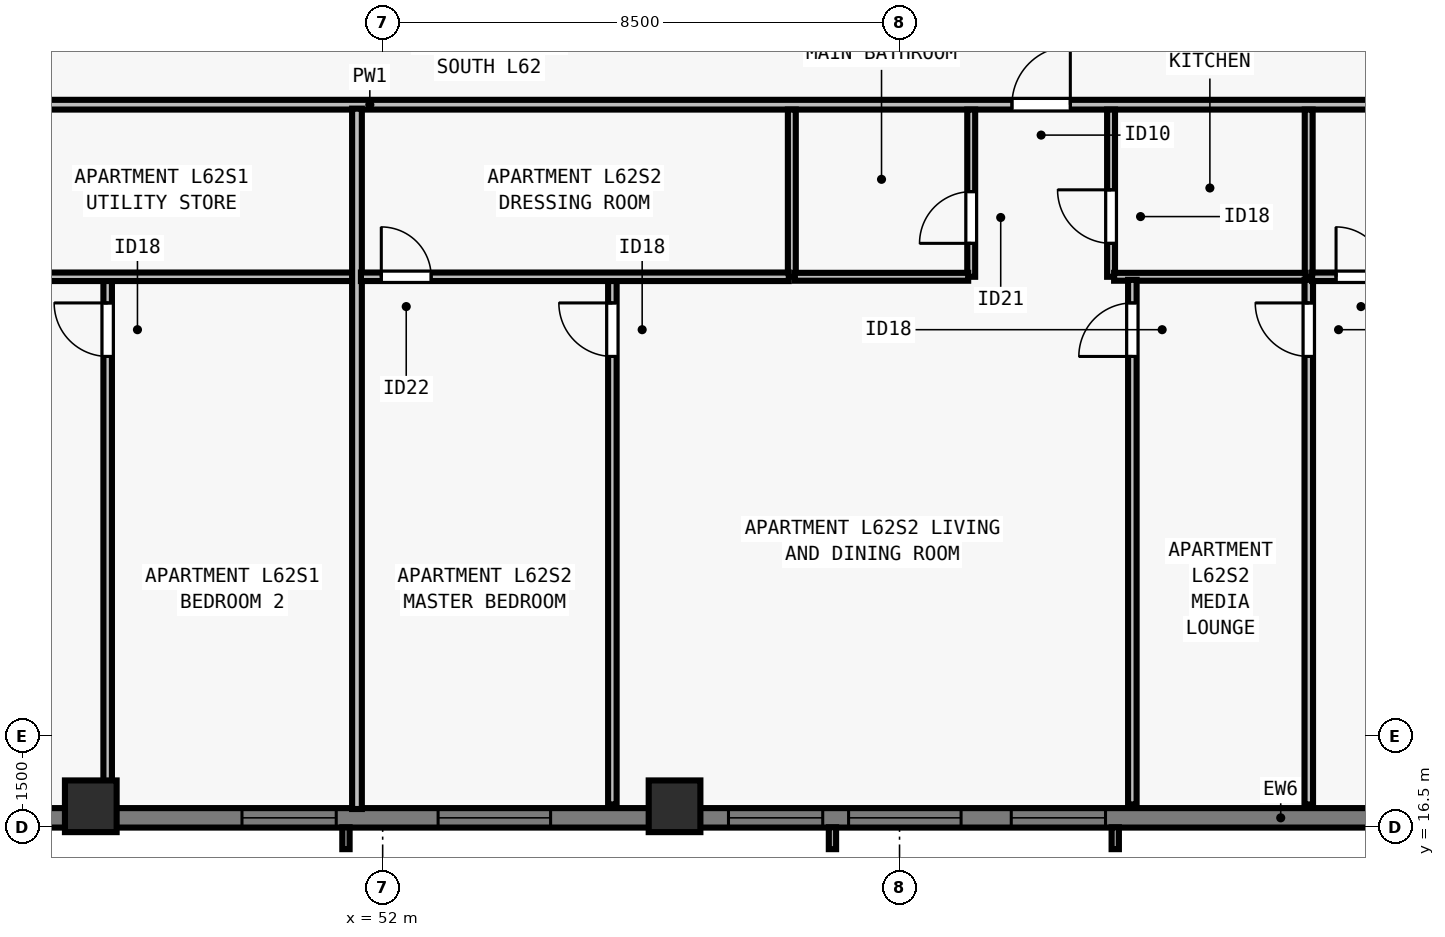
"""IFC4 building model, lengths in metres.
Left out: names, types, materials, properties, quantities, classifications, styles, units other than length and angle.
Written with IfcOpenShell. Run it as: python <this file> out.ifc"""

import sys

from ifc_helpers import new_model, si_unit, direction, frame, frame_2d, origin, origin_2d, place, context, subcontext, project, spatial, rectangle, extrude, element, fill, save


model = new_model("IFC4")
c1 = context("Model", 3, precision=1e-05, world=origin(), true_north=direction((0.0, 1.0)))
c2 = subcontext(c1, "Body", "Model", "MODEL_VIEW")
j1 = project(units=[si_unit("LENGTHUNIT", "METRE"), si_unit("PLANEANGLEUNIT", "RADIAN")], contexts=[c1])
p1 = place(None, origin())
s1 = spatial("IfcSite", under=j1, at=p1, CompositionType="ELEMENT")
p2 = place(p1, origin())
s2 = spatial("IfcBuilding", under=s1, at=p2, CompositionType="ELEMENT")
p3 = place(p2, frame((0.0, 0.0, 227.0)))
s3 = spatial("IfcBuildingStorey", under=s2, at=p3, CompositionType="ELEMENT", Elevation=227.0)
for number, where, z_axis, x_axis in (
    (1, (47.2, 16.85, 0.0), (0.0, 0.0, 1.0), (1.0, 0.0, 0.0)),
    (2, (56.8, 16.85, 0.0), (0.0, 0.0, 1.0), (1.0, 0.0, 0.0)),
):
    element("IfcColumn", number, at=place(p3, frame(where, z_axis=z_axis, x_axis=x_axis)), inside=s3, PredefinedType="COLUMN", context=c2, shape_type="SweptSolid", body=[
        extrude(rectangle(XDim=0.85, YDim=0.85, at=origin_2d()), origin(), (0.0, 0.0, 1.0), 3.5),
    ])
p4 = place(p3, frame((69.5, 16.66, 0.0), z_axis=(0.0, 0.0, 1.0), x_axis=(-1.0, 0.0, 0.0)))
e3 = element("IfcWall", 3, at=p4, inside=s3, PredefinedType="SOLIDWALL", context=c2, shape_type="SweptSolid", body=[
    extrude(rectangle(XDim=34.702, YDim=0.32, at=frame_2d((17.351, 0.0))), origin(), (0.0, 0.0, 1.0), 3.29),
])
p5 = place(p4, frame((5.613, 0.0, 0.8)))
e4 = element("IfcOpeningElement", 4, at=p5, cuts=e3, PredefinedType="OPENING", context=c2, shape_type="SweptSolid", body=[
    extrude(rectangle(XDim=1.55, YDim=1.678, at=frame_2d((0.775, 0.839))), frame((0.0, 0.17, 0.0), z_axis=(0.0, -1.0, 0.0), x_axis=(1.0, 0.0, 0.0)), (0.0, 0.0, 1.0), 0.34),
])
p6 = place(p4, frame((7.988, 0.0, 0.8)))
e5 = element("IfcOpeningElement", 5, at=p6, cuts=e3, PredefinedType="OPENING", context=c2, shape_type="SweptSolid", body=[
    extrude(rectangle(XDim=1.85, YDim=1.678, at=frame_2d((0.925, 0.839))), frame((0.0, 0.17, 0.0), z_axis=(0.0, -1.0, 0.0), x_axis=(1.0, 0.0, 0.0)), (0.0, 0.0, 1.0), 0.34),
])
p7 = place(p4, frame((10.263, 0.0, 0.8)))
e6 = element("IfcOpeningElement", 6, at=p7, cuts=e3, PredefinedType="OPENING", context=c2, shape_type="SweptSolid", body=[
    extrude(rectangle(XDim=1.55, YDim=1.678, at=frame_2d((0.775, 0.839))), frame((0.0, 0.17, 0.0), z_axis=(0.0, -1.0, 0.0), x_axis=(1.0, 0.0, 0.0)), (0.0, 0.0, 1.0), 0.34),
])
p8 = place(p4, frame((14.738, 0.0, 0.8)))
e7 = element("IfcOpeningElement", 7, at=p8, cuts=e3, PredefinedType="OPENING", context=c2, shape_type="SweptSolid", body=[
    extrude(rectangle(XDim=1.85, YDim=1.678, at=frame_2d((0.925, 0.839))), frame((0.0, 0.17, 0.0), z_axis=(0.0, -1.0, 0.0), x_axis=(1.0, 0.0, 0.0)), (0.0, 0.0, 1.0), 0.34),
])
p9 = place(p4, frame((18.264, 0.0, 0.8)))
e8 = element("IfcOpeningElement", 8, at=p9, cuts=e3, PredefinedType="OPENING", context=c2, shape_type="SweptSolid", body=[
    extrude(rectangle(XDim=1.55, YDim=1.678, at=frame_2d((0.775, 0.839))), frame((0.0, 0.17, 0.0), z_axis=(0.0, -1.0, 0.0), x_axis=(1.0, 0.0, 0.0)), (0.0, 0.0, 1.0), 0.34),
])
p10 = place(p4, frame((24.564, 0.0, 0.8)))
e9 = element("IfcOpeningElement", 9, at=p10, cuts=e3, PredefinedType="OPENING", context=c2, shape_type="SweptSolid", body=[
    extrude(rectangle(XDim=1.55, YDim=1.678, at=frame_2d((0.775, 0.839))), frame((0.0, 0.17, 0.0), z_axis=(0.0, -1.0, 0.0), x_axis=(1.0, 0.0, 0.0)), (0.0, 0.0, 1.0), 0.34),
])
p11 = place(p4, frame((28.24, 0.0, 0.8)))
e10 = element("IfcOpeningElement", 10, at=p11, cuts=e3, PredefinedType="OPENING", context=c2, shape_type="SweptSolid", body=[
    extrude(rectangle(XDim=1.85, YDim=1.678, at=frame_2d((0.925, 0.839))), frame((0.0, 0.17, 0.0), z_axis=(0.0, -1.0, 0.0), x_axis=(1.0, 0.0, 0.0)), (0.0, 0.0, 1.0), 0.34),
])
p12 = place(p3, frame((29.805, 28.387, 0.0), z_axis=(0.0, 0.0, 1.0), x_axis=(1.0, 0.0, 0.0)))
e11 = element("IfcWall", 11, at=p12, inside=s3, PredefinedType="PARTITIONING", context=c2, shape_type="SweptSolid", body=[
    extrude(rectangle(XDim=44.39, YDim=0.16, at=frame_2d((22.195, 0.0))), origin(), (0.0, 0.0, 1.0), 2.958),
])
p13 = place(p12, frame((10.464, 0.0, 0.0)))
e12 = element("IfcOpeningElement", 12, at=p13, cuts=e11, PredefinedType="OPENING", context=c2, shape_type="SweptSolid", body=[
    extrude(rectangle(XDim=0.96, YDim=2.18, at=frame_2d((0.48, 1.09))), frame((0.0, 0.09, 0.0), z_axis=(0.0, -1.0, 0.0), x_axis=(1.0, 0.0, 0.0)), (0.0, 0.0, 1.0), 0.18),
])
p14 = place(p12, frame((32.544, 0.0, 0.0)))
e13 = element("IfcOpeningElement", 13, at=p14, cuts=e11, PredefinedType="OPENING", context=c2, shape_type="SweptSolid", body=[
    extrude(rectangle(XDim=0.96, YDim=2.18, at=frame_2d((0.48, 1.09))), frame((0.0, 0.09, 0.0), z_axis=(0.0, -1.0, 0.0), x_axis=(1.0, 0.0, 0.0)), (0.0, 0.0, 1.0), 0.18),
])
p15 = place(p3, frame((47.478, 16.88, 0.0), z_axis=(0.0, 0.0, 1.0), x_axis=(0.0, 1.0, 0.0)))
e14 = element("IfcWall", 14, at=p15, inside=s3, PredefinedType="PARTITIONING", context=c2, shape_type="SweptSolid", body=[
    extrude(rectangle(XDim=8.718, YDim=0.14, at=frame_2d((4.359, 0.0))), origin(), (0.0, 0.0, 1.0), 2.958),
])
p16 = place(p15, frame((7.367, 0.0, 0.0)))
e15 = element("IfcOpeningElement", 15, at=p16, cuts=e14, PredefinedType="OPENING", context=c2, shape_type="SweptSolid", body=[
    extrude(rectangle(XDim=0.88, YDim=2.1, at=frame_2d((0.44, 1.05))), frame((0.0, 0.08, 0.0), z_axis=(0.0, -1.0, 0.0), x_axis=(1.0, 0.0, 0.0)), (0.0, 0.0, 1.0), 0.16),
])
p17 = place(p3, frame((45.199, 25.558, 0.0), z_axis=(0.0, 0.0, 1.0), x_axis=(1.0, 0.0, 0.0)))
e16 = element("IfcWall", 16, at=p17, inside=s3, PredefinedType="PARTITIONING", context=c2, shape_type="SweptSolid", body=[
    extrude(rectangle(XDim=6.429, YDim=0.14, at=frame_2d((3.214, 0.0))), origin(), (0.0, 0.0, 1.0), 3.29),
])
p18 = place(p17, frame((0.4, 0.0, 0.0)))
e17 = element("IfcOpeningElement", 17, at=p18, cuts=e16, PredefinedType="OPENING", context=c2, shape_type="SweptSolid", body=[
    extrude(rectangle(XDim=0.82, YDim=2.1, at=frame_2d((0.41, 1.05))), frame((0.0, 0.08, 0.0), z_axis=(0.0, -1.0, 0.0), x_axis=(1.0, 0.0, 0.0)), (0.0, 0.0, 1.0), 0.16),
])
p19 = place(p3, frame((51.577, 16.805, 0.0), z_axis=(0.0, 0.0, 1.0), x_axis=(0.0, 1.0, 0.0)))
e18 = element("IfcWall", 18, at=p19, inside=s3, PredefinedType="PARTITIONING", context=c2, shape_type="SweptSolid", body=[
    extrude(rectangle(XDim=11.518, YDim=0.16, at=frame_2d((5.759, 0.0))), origin(), (0.0, 0.0, 1.0), 2.958),
])
p20 = place(p3, frame((58.729, 25.558, 0.0), z_axis=(0.0, 0.0, 1.0), x_axis=(0.0, 1.0, 0.0)))
e19 = element("IfcWall", 19, at=p20, inside=s3, PredefinedType="PLUMBINGWALL", context=c2, shape_type="SweptSolid", body=[
    extrude(rectangle(XDim=2.75, YDim=0.13, at=frame_2d((1.375, 0.0))), origin(), (0.0, 0.0, 1.0), 3.29),
])
p21 = place(p3, frame((61.679, 25.558, 0.0), z_axis=(0.0, 0.0, 1.0), x_axis=(0.0, 1.0, 0.0)))
e20 = element("IfcWall", 20, at=p21, inside=s3, PredefinedType="PLUMBINGWALL", context=c2, shape_type="SweptSolid", body=[
    extrude(rectangle(XDim=2.75, YDim=0.13, at=frame_2d((1.375, 0.0))), origin(), (0.0, 0.0, 1.0), 3.29),
])
p22 = place(p21, frame((0.55, 0.0, 0.0)))
e21 = element("IfcOpeningElement", 21, at=p22, cuts=e20, PredefinedType="OPENING", context=c2, shape_type="SweptSolid", body=[
    extrude(rectangle(XDim=0.85, YDim=2.08, at=frame_2d((0.425, 1.04))), frame((0.0, 0.075, 0.0), z_axis=(0.0, -1.0, 0.0), x_axis=(1.0, 0.0, 0.0)), (0.0, 0.0, 1.0), 0.15),
])
p23 = place(p3, frame((58.779, 25.558, 0.0), z_axis=(0.0, 0.0, 1.0), x_axis=(1.0, 0.0, 0.0)))
e22 = element("IfcWall", 22, at=p23, inside=s3, PredefinedType="PLUMBINGWALL", context=c2, shape_type="SweptSolid", body=[
    extrude(rectangle(XDim=2.85, YDim=0.13, at=frame_2d((1.425, 0.0))), origin(), (0.0, 0.0, 1.0), 3.29),
])
p24 = place(p3, frame((67.229, 25.558, 0.0), z_axis=(0.0, 0.0, 1.0), x_axis=(0.0, 1.0, 0.0)))
e23 = element("IfcWall", 23, at=p24, inside=s3, PredefinedType="PLUMBINGWALL", context=c2, shape_type="SweptSolid", body=[
    extrude(rectangle(XDim=2.75, YDim=0.13, at=frame_2d((1.375, 0.0))), origin(), (0.0, 0.0, 1.0), 3.29),
])
p25 = place(p3, frame((63.979, 25.558, 0.0), z_axis=(0.0, 0.0, 1.0), x_axis=(0.0, 1.0, 0.0)))
e24 = element("IfcWall", 24, at=p25, inside=s3, PredefinedType="PLUMBINGWALL", context=c2, shape_type="SweptSolid", body=[
    extrude(rectangle(XDim=2.75, YDim=0.13, at=frame_2d((1.375, 0.0))), origin(), (0.0, 0.0, 1.0), 3.29),
])
p26 = place(p25, frame((0.55, 0.0, 0.0)))
e25 = element("IfcOpeningElement", 25, at=p26, cuts=e24, PredefinedType="OPENING", context=c2, shape_type="SweptSolid", body=[
    extrude(rectangle(XDim=0.88, YDim=2.1, at=frame_2d((0.44, 1.05))), frame((0.0, 0.075, 0.0), z_axis=(0.0, -1.0, 0.0), x_axis=(1.0, 0.0, 0.0)), (0.0, 0.0, 1.0), 0.15),
])
p27 = place(p3, frame((64.029, 25.558, 0.0), z_axis=(0.0, 0.0, 1.0), x_axis=(1.0, 0.0, 0.0)))
e26 = element("IfcWall", 26, at=p27, inside=s3, PredefinedType="PLUMBINGWALL", context=c2, shape_type="SweptSolid", body=[
    extrude(rectangle(XDim=3.15, YDim=0.13, at=frame_2d((1.575, 0.0))), origin(), (0.0, 0.0, 1.0), 3.29),
])
p28 = place(p3, frame((55.778, 16.88, 0.0), z_axis=(0.0, 0.0, 1.0), x_axis=(0.0, 1.0, 0.0)))
e27 = element("IfcWall", 27, at=p28, inside=s3, PredefinedType="PARTITIONING", context=c2, shape_type="SweptSolid", body=[
    extrude(rectangle(XDim=8.718, YDim=0.14, at=frame_2d((4.359, 0.0))), origin(), (0.0, 0.0, 1.0), 3.29),
])
p29 = place(p28, frame((7.367, 0.0, 0.0)))
e28 = element("IfcOpeningElement", 28, at=p29, cuts=e27, PredefinedType="OPENING", context=c2, shape_type="SweptSolid", body=[
    extrude(rectangle(XDim=0.88, YDim=2.1, at=frame_2d((0.44, 1.05))), frame((0.0, 0.08, 0.0), z_axis=(0.0, -1.0, 0.0), x_axis=(1.0, 0.0, 0.0)), (0.0, 0.0, 1.0), 0.16),
])
p30 = place(p3, frame((51.643, 25.558, 0.0), z_axis=(0.0, 0.0, 1.0), x_axis=(1.0, 0.0, 0.0)))
e29 = element("IfcWall", 29, at=p30, inside=s3, PredefinedType="PARTITIONING", context=c2, shape_type="SweptSolid", body=[
    extrude(rectangle(XDim=7.036, YDim=0.14, at=frame_2d((3.518, 0.0))), origin(), (0.0, 0.0, 1.0), 3.29),
])
p31 = place(p30, frame((0.335, 0.0, 0.0)))
e30 = element("IfcOpeningElement", 30, at=p31, cuts=e29, PredefinedType="OPENING", context=c2, shape_type="SweptSolid", body=[
    extrude(rectangle(XDim=0.82, YDim=2.1, at=frame_2d((0.41, 1.05))), frame((0.0, 0.08, 0.0), z_axis=(0.0, -1.0, 0.0), x_axis=(1.0, 0.0, 0.0)), (0.0, 0.0, 1.0), 0.16),
])
p32 = place(p3, frame((67.23, 16.88, 0.0), z_axis=(0.0, 0.0, 1.0), x_axis=(0.0, 1.0, 0.0)))
e31 = element("IfcWall", 31, at=p32, inside=s3, PredefinedType="PARTITIONING", context=c2, shape_type="SweptSolid", body=[
    extrude(rectangle(XDim=8.628, YDim=0.14, at=frame_2d((4.314, 0.0))), origin(), (0.0, 0.0, 1.0), 2.573),
])
p33 = place(p32, frame((7.367, 0.0, 0.0)))
e32 = element("IfcOpeningElement", 32, at=p33, cuts=e31, PredefinedType="OPENING", context=c2, shape_type="SweptSolid", body=[
    extrude(rectangle(XDim=0.88, YDim=2.1, at=frame_2d((0.44, 1.05))), frame((0.0, 0.08, 0.0), z_axis=(0.0, -1.0, 0.0), x_axis=(1.0, 0.0, 0.0)), (0.0, 0.0, 1.0), 0.16),
])
p34 = place(p3, frame((67.285, 25.558, 0.0), z_axis=(0.0, 0.0, 1.0), x_axis=(1.0, 0.0, 0.0)))
e33 = element("IfcWall", 33, at=p34, inside=s3, PredefinedType="PARTITIONING", context=c2, shape_type="SweptSolid", body=[
    extrude(rectangle(XDim=6.845, YDim=0.14, at=frame_2d((3.422, 0.0))), origin(), (0.0, 0.0, 1.0), 2.958),
])
p35 = place(p34, frame((0.394, 0.0, 0.0)))
e34 = element("IfcOpeningElement", 34, at=p35, cuts=e33, PredefinedType="OPENING", context=c2, shape_type="SweptSolid", body=[
    extrude(rectangle(XDim=0.82, YDim=2.1, at=frame_2d((0.41, 1.05))), frame((0.0, 0.08, 0.0), z_axis=(0.0, -1.0, 0.0), x_axis=(1.0, 0.0, 0.0)), (0.0, 0.0, 1.0), 0.16),
])
p36 = place(p3, frame((64.329, 16.88, 0.0), z_axis=(0.0, 0.0, 1.0), x_axis=(0.0, 1.0, 0.0)))
e35 = element("IfcWall", 35, at=p36, inside=s3, PredefinedType="PARTITIONING", context=c2, shape_type="SweptSolid", body=[
    extrude(rectangle(XDim=8.628, YDim=0.14, at=frame_2d((4.314, 0.0))), origin(), (0.0, 0.0, 1.0), 2.573),
])
p37 = place(p36, frame((7.367, 0.0, 0.0)))
e36 = element("IfcOpeningElement", 36, at=p37, cuts=e35, PredefinedType="OPENING", context=c2, shape_type="SweptSolid", body=[
    extrude(rectangle(XDim=0.88, YDim=2.1, at=frame_2d((0.44, 1.05))), frame((0.0, 0.08, 0.0), z_axis=(0.0, -1.0, 0.0), x_axis=(1.0, 0.0, 0.0)), (0.0, 0.0, 1.0), 0.16),
])
p38 = place(p5, origin())
e37 = element("IfcWindow", 37, at=p38, inside=s3, PartitioningType="SINGLE_PANEL", PredefinedType="WINDOW", context=c2, shape_type="SweptSolid", body=[
    extrude(rectangle(XDim=1.55, YDim=1.678, at=frame_2d((0.775, 0.839))), frame((0.0, -0.05, 0.0), z_axis=(0.0, -1.0, 0.0), x_axis=(1.0, 0.0, 0.0)), (0.0, 0.0, 1.0), 0.06),
])
fill(e4, e37)
p39 = place(p6, origin())
e38 = element("IfcWindow", 38, at=p39, inside=s3, PartitioningType="SINGLE_PANEL", PredefinedType="WINDOW", context=c2, shape_type="SweptSolid", body=[
    extrude(rectangle(XDim=1.85, YDim=1.678, at=frame_2d((0.925, 0.839))), frame((0.0, -0.05, 0.0), z_axis=(0.0, -1.0, 0.0), x_axis=(1.0, 0.0, 0.0)), (0.0, 0.0, 1.0), 0.06),
])
fill(e5, e38)
p40 = place(p7, origin())
e39 = element("IfcWindow", 39, at=p40, inside=s3, PartitioningType="SINGLE_PANEL", PredefinedType="WINDOW", context=c2, shape_type="SweptSolid", body=[
    extrude(rectangle(XDim=1.55, YDim=1.678, at=frame_2d((0.775, 0.839))), frame((0.0, -0.05, 0.0), z_axis=(0.0, -1.0, 0.0), x_axis=(1.0, 0.0, 0.0)), (0.0, 0.0, 1.0), 0.06),
])
fill(e6, e39)
p41 = place(p8, origin())
e40 = element("IfcWindow", 40, at=p41, inside=s3, PartitioningType="SINGLE_PANEL", PredefinedType="WINDOW", context=c2, shape_type="SweptSolid", body=[
    extrude(rectangle(XDim=1.85, YDim=1.678, at=frame_2d((0.925, 0.839))), frame((0.0, -0.05, 0.0), z_axis=(0.0, -1.0, 0.0), x_axis=(1.0, 0.0, 0.0)), (0.0, 0.0, 1.0), 0.06),
])
fill(e7, e40)
p42 = place(p9, origin())
e41 = element("IfcWindow", 41, at=p42, inside=s3, PartitioningType="SINGLE_PANEL", PredefinedType="WINDOW", context=c2, shape_type="SweptSolid", body=[
    extrude(rectangle(XDim=1.55, YDim=1.678, at=frame_2d((0.775, 0.839))), frame((0.0, -0.05, 0.0), z_axis=(0.0, -1.0, 0.0), x_axis=(1.0, 0.0, 0.0)), (0.0, 0.0, 1.0), 0.06),
])
fill(e8, e41)
p43 = place(p16, origin())
e42 = element("IfcDoor", 42, at=p43, inside=s3, OperationType="SINGLE_SWING_RIGHT", PredefinedType="DOOR", context=c2, shape_type="SweptSolid", body=[
    extrude(rectangle(XDim=0.88, YDim=2.1, at=frame_2d((0.44, 1.05))), frame((0.0, 0.025, 0.0), z_axis=(0.0, -1.0, 0.0), x_axis=(1.0, 0.0, 0.0)), (0.0, 0.0, 1.0), 0.05),
])
fill(e15, e42)
p44 = place(p22, origin())
e43 = element("IfcDoor", 43, at=p44, inside=s3, OperationType="SINGLE_SWING_LEFT", PredefinedType="DOOR", context=c2, shape_type="SweptSolid", body=[
    extrude(rectangle(XDim=0.85, YDim=2.08, at=frame_2d((0.425, 1.04))), frame((0.0, 0.025, 0.0), z_axis=(0.0, -1.0, 0.0), x_axis=(1.0, 0.0, 0.0)), (0.0, 0.0, 1.0), 0.05),
])
fill(e21, e43)
p45 = place(p26, origin())
e44 = element("IfcDoor", 44, at=p45, inside=s3, OperationType="SINGLE_SWING_RIGHT", PredefinedType="DOOR", context=c2, shape_type="SweptSolid", body=[
    extrude(rectangle(XDim=0.88, YDim=2.1, at=frame_2d((0.44, 1.05))), frame((0.0, 0.025, 0.0), z_axis=(0.0, -1.0, 0.0), x_axis=(1.0, 0.0, 0.0)), (0.0, 0.0, 1.0), 0.05),
])
fill(e25, e44)
p46 = place(p31, origin())
e45 = element("IfcDoor", 45, at=p46, inside=s3, OperationType="SINGLE_SWING_LEFT", PredefinedType="DOOR", context=c2, shape_type="SweptSolid", body=[
    extrude(rectangle(XDim=0.82, YDim=2.1, at=frame_2d((0.41, 1.05))), frame((0.0, 0.025, 0.0), z_axis=(0.0, -1.0, 0.0), x_axis=(1.0, 0.0, 0.0)), (0.0, 0.0, 1.0), 0.05),
])
fill(e30, e45)
p47 = place(p29, origin())
e46 = element("IfcDoor", 46, at=p47, inside=s3, OperationType="SINGLE_SWING_RIGHT", PredefinedType="DOOR", context=c2, shape_type="SweptSolid", body=[
    extrude(rectangle(XDim=0.88, YDim=2.1, at=frame_2d((0.44, 1.05))), frame((0.0, 0.025, 0.0), z_axis=(0.0, -1.0, 0.0), x_axis=(1.0, 0.0, 0.0)), (0.0, 0.0, 1.0), 0.05),
])
fill(e28, e46)
p48 = place(p35, origin())
e47 = element("IfcDoor", 47, at=p48, inside=s3, OperationType="SINGLE_SWING_LEFT", PredefinedType="DOOR", context=c2, shape_type="SweptSolid", body=[
    extrude(rectangle(XDim=0.82, YDim=2.1, at=frame_2d((0.41, 1.05))), frame((0.0, 0.025, 0.0), z_axis=(0.0, -1.0, 0.0), x_axis=(1.0, 0.0, 0.0)), (0.0, 0.0, 1.0), 0.05),
])
fill(e34, e47)
p49 = place(p33, origin())
e48 = element("IfcDoor", 48, at=p49, inside=s3, OperationType="SINGLE_SWING_RIGHT", PredefinedType="DOOR", context=c2, shape_type="SweptSolid", body=[
    extrude(rectangle(XDim=0.88, YDim=2.1, at=frame_2d((0.44, 1.05))), frame((0.0, 0.025, 0.0), z_axis=(0.0, -1.0, 0.0), x_axis=(1.0, 0.0, 0.0)), (0.0, 0.0, 1.0), 0.05),
])
fill(e32, e48)
p50 = place(p37, origin())
e49 = element("IfcDoor", 49, at=p50, inside=s3, OperationType="SINGLE_SWING_LEFT", PredefinedType="DOOR", context=c2, shape_type="SweptSolid", body=[
    extrude(rectangle(XDim=0.88, YDim=2.1, at=frame_2d((0.44, 1.05))), frame((0.0, 0.025, 0.0), z_axis=(0.0, -1.0, 0.0), x_axis=(1.0, 0.0, 0.0)), (0.0, 0.0, 1.0), 0.05),
])
fill(e36, e49)
p51 = place(p14, origin())
e50 = element("IfcDoor", 50, at=p51, inside=s3, OperationType="SINGLE_SWING_RIGHT", PredefinedType="DOOR", context=c2, shape_type="SweptSolid", body=[
    extrude(rectangle(XDim=0.96, YDim=2.18, at=frame_2d((0.48, 1.09))), frame((0.0, 0.025, 0.0), z_axis=(0.0, -1.0, 0.0), x_axis=(1.0, 0.0, 0.0)), (0.0, 0.0, 1.0), 0.05),
])
fill(e13, e50)
save(model, sys.argv[1])
